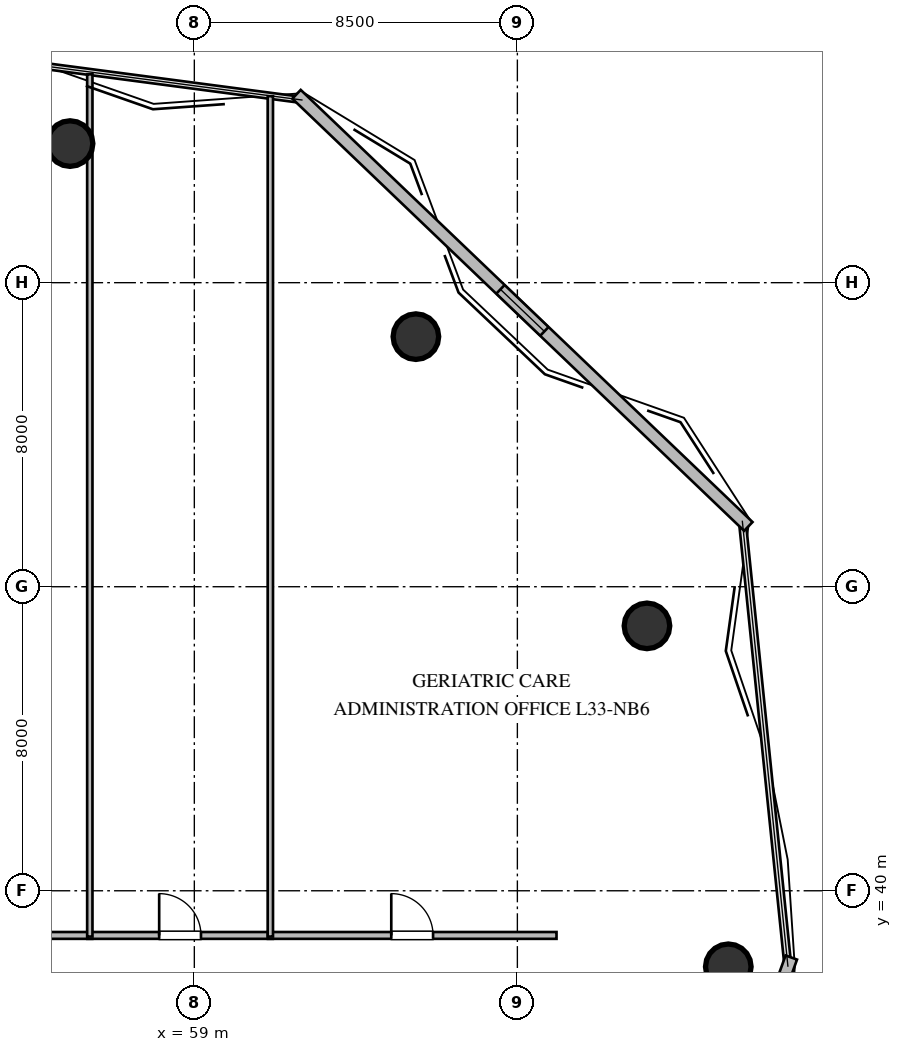
"""IFC4 building model, lengths in metres.
Left out: names, types, materials, properties, quantities, classifications, styles, units other than length and angle.
Written with IfcOpenShell. Run it as: python <this file> out.ifc"""

import sys

from ifc_helpers import new_model, si_unit, direction, frame, frame_2d, origin, origin_2d, place, context, subcontext, project, spatial, rectangle, circle, extrude, element, fill, save


model = new_model("IFC4")
c1 = context("Model", 3, precision=1e-05, world=origin(), true_north=direction((0.0, 1.0)))
c2 = subcontext(c1, "Body", "Model", "MODEL_VIEW")
j1 = project(units=[si_unit("LENGTHUNIT", "METRE"), si_unit("PLANEANGLEUNIT", "RADIAN")], contexts=[c1])
p1 = place(None, origin())
s1 = spatial("IfcSite", under=j1, at=p1, CompositionType="ELEMENT")
p2 = place(p1, origin())
s2 = spatial("IfcBuilding", under=s1, at=p2, CompositionType="ELEMENT")
p3 = place(p2, frame((0.0, 0.0, 127.8)))
s3 = spatial("IfcBuildingStorey", under=s2, at=p3, CompositionType="ELEMENT", Elevation=127.8)
for number, where, z_axis, x_axis in (
    (1, (73.05, 38.0, 0.0), (0.0, 0.0, 1.0), (1.0, 0.0, 0.0)),
    (2, (70.91, 46.97, 0.0), (0.0, 0.0, 1.0), (1.0, 0.0, 0.0)),
    (3, (64.83, 54.58, 0.0), (0.0, 0.0, 1.0), (1.0, 0.0, 0.0)),
    (4, (55.73, 59.66, 0.0), (0.0, 0.0, 1.0), (1.0, 0.0, 0.0)),
):
    element("IfcColumn", number, at=place(p3, frame(where, z_axis=z_axis, x_axis=x_axis)), inside=s3, PredefinedType="COLUMN", context=c2, shape_type="SweptSolid", body=[
        extrude(circle(Radius=0.6, at=origin_2d()), origin(), (0.0, 0.0, 1.0), 3.6),
    ])
p4 = place(p3, frame((74.708, 38.244, 0.0), z_axis=(0.0, 0.0, 1.0), x_axis=(-0.340324669139, -0.94030799187, 0.0)))
e5 = element("IfcWall", 5, at=p4, inside=s3, PredefinedType="STANDARD", context=c2, shape_type="SweptSolid", body=[
    extrude(rectangle(XDim=13.81, YDim=0.32, at=frame_2d((6.905, 0.0))), origin(), (0.0, 0.0, 1.0), 3.36),
])
p5 = place(p3, frame((61.689, 60.957, 0.0), z_axis=(0.0, 0.0, 1.0), x_axis=(0.722641212534, -0.691223319881, 0.0)))
e6 = element("IfcWall", 6, at=p5, inside=s3, PredefinedType="STANDARD", context=c2, shape_type="SweptSolid", body=[
    extrude(rectangle(XDim=16.451, YDim=0.32, at=frame_2d((8.225, 0.0))), origin(), (0.0, 0.0, 1.0), 3.36),
])
p6 = place(p5, frame((7.425, 0.0, 1.05)))
e7 = element("IfcOpeningElement", 7, at=p6, cuts=e6, PredefinedType="OPENING", context=c2, shape_type="SweptSolid", body=[
    extrude(rectangle(XDim=1.6, YDim=1.5, at=frame_2d((0.8, 0.75))), frame((0.0, 0.17, 0.0), z_axis=(0.0, -1.0, 0.0), x_axis=(1.0, 0.0, 0.0)), (0.0, 0.0, 1.0), 0.34),
])
p7 = place(p3, frame((51.435, 38.825, 0.0), z_axis=(0.0, 0.0, 1.0), x_axis=(1.0, 0.0, 0.0)))
e8 = element("IfcWall", 8, at=p7, inside=s3, PredefinedType="PARTITIONING", context=c2, shape_type="SweptSolid", body=[
    extrude(rectangle(XDim=4.88, YDim=0.18, at=frame_2d((2.44, 0.0))), origin(), (0.0, 0.0, 1.0), 3.36),
])
p8 = place(p7, frame((1.89, 0.0, 0.0)))
e9 = element("IfcOpeningElement", 9, at=p8, cuts=e8, PredefinedType="OPENING", context=c2, shape_type="SweptSolid", body=[
    extrude(rectangle(XDim=1.1, YDim=2.1, at=frame_2d((0.55, 1.05))), frame((0.0, 0.1, 0.0), z_axis=(0.0, -1.0, 0.0), x_axis=(1.0, 0.0, 0.0)), (0.0, 0.0, 1.0), 0.2),
])
p9 = place(p3, frame((56.185, 38.825, 0.0), z_axis=(0.0, 0.0, 1.0), x_axis=(1.0, 0.0, 0.0)))
e10 = element("IfcWall", 10, at=p9, inside=s3, PredefinedType="PARTITIONING", context=c2, shape_type="SweptSolid", body=[
    extrude(rectangle(XDim=4.88, YDim=0.18, at=frame_2d((2.44, 0.0))), origin(), (0.0, 0.0, 1.0), 3.36),
])
p10 = place(p9, frame((1.89, 0.0, 0.0)))
e11 = element("IfcOpeningElement", 11, at=p10, cuts=e10, PredefinedType="OPENING", context=c2, shape_type="SweptSolid", body=[
    extrude(rectangle(XDim=1.1, YDim=2.1, at=frame_2d((0.55, 1.05))), frame((0.0, 0.1, 0.0), z_axis=(0.0, -1.0, 0.0), x_axis=(1.0, 0.0, 0.0)), (0.0, 0.0, 1.0), 0.2),
])
p11 = place(p3, frame((60.935, 38.825, 0.0), z_axis=(0.0, 0.0, 1.0), x_axis=(1.0, 0.0, 0.0)))
e12 = element("IfcWall", 12, at=p11, inside=s3, PredefinedType="PARTITIONING", context=c2, shape_type="SweptSolid", body=[
    extrude(rectangle(XDim=7.595, YDim=0.18, at=frame_2d((3.797, 0.0))), origin(), (0.0, 0.0, 1.0), 3.36),
])
p12 = place(p11, frame((3.247, 0.0, 0.0)))
e13 = element("IfcOpeningElement", 13, at=p12, cuts=e12, PredefinedType="OPENING", context=c2, shape_type="SweptSolid", body=[
    extrude(rectangle(XDim=1.1, YDim=2.1, at=frame_2d((0.55, 1.05))), frame((0.0, 0.1, 0.0), z_axis=(0.0, -1.0, 0.0), x_axis=(1.0, 0.0, 0.0)), (0.0, 0.0, 1.0), 0.2),
])
p13 = place(p3, frame((56.25, 61.482, 0.0), z_axis=(0.0, 0.0, 1.0), x_axis=(0.0, -1.0, 0.0)))
e14 = element("IfcWall", 14, at=p13, inside=s3, PredefinedType="PARTITIONING", context=c2, shape_type="SweptSolid", body=[
    extrude(rectangle(XDim=22.687, YDim=0.14, at=frame_2d((11.344, 0.0))), origin(), (0.0, 0.0, 1.0), 3.36),
])
p14 = place(p3, frame((61.0, 60.907, 0.0), z_axis=(0.0, 0.0, 1.0), x_axis=(0.0, -1.0, 0.0)))
e15 = element("IfcWall", 15, at=p14, inside=s3, PredefinedType="PARTITIONING", context=c2, shape_type="SweptSolid", body=[
    extrude(rectangle(XDim=22.112, YDim=0.14, at=frame_2d((11.056, 0.0))), origin(), (0.0, 0.0, 1.0), 3.36),
])
p15 = place(p6, origin())
e16 = element("IfcWindow", 16, at=p15, inside=s3, PartitioningType="SINGLE_PANEL", PredefinedType="WINDOW", context=c2, shape_type="SweptSolid", body=[
    extrude(rectangle(XDim=1.6, YDim=1.5, at=frame_2d((0.8, 0.75))), frame((0.0, 0.03, 0.0), z_axis=(0.0, -1.0, 0.0), x_axis=(1.0, 0.0, 0.0)), (0.0, 0.0, 1.0), 0.06),
])
fill(e7, e16)
p16 = place(p10, origin())
e17 = element("IfcDoor", 17, at=p16, inside=s3, OperationType="SINGLE_SWING_LEFT", PredefinedType="DOOR", context=c2, shape_type="SweptSolid", body=[
    extrude(rectangle(XDim=1.1, YDim=2.1, at=frame_2d((0.55, 1.05))), frame((0.0, 0.025, 0.0), z_axis=(0.0, -1.0, 0.0), x_axis=(1.0, 0.0, 0.0)), (0.0, 0.0, 1.0), 0.05),
])
fill(e11, e17)
p17 = place(p12, origin())
e18 = element("IfcDoor", 18, at=p17, inside=s3, OperationType="SINGLE_SWING_LEFT", PredefinedType="DOOR", context=c2, shape_type="SweptSolid", body=[
    extrude(rectangle(XDim=1.1, YDim=2.1, at=frame_2d((0.55, 1.05))), frame((0.0, 0.025, 0.0), z_axis=(0.0, -1.0, 0.0), x_axis=(1.0, 0.0, 0.0)), (0.0, 0.0, 1.0), 0.05),
])
fill(e13, e18)
save(model, sys.argv[1])
